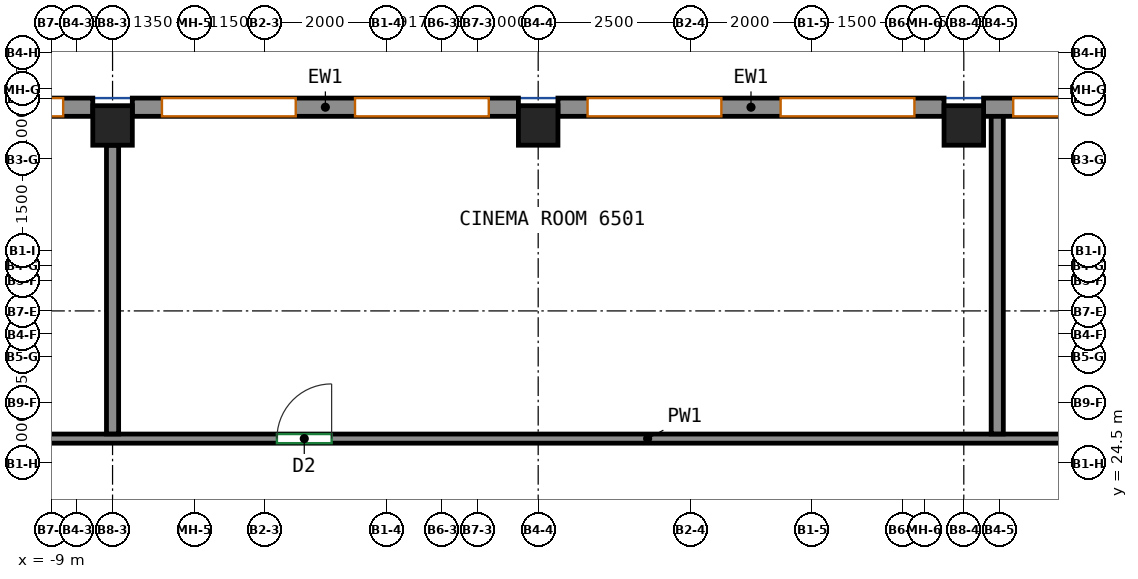
"""IFC4 building model, lengths in metres.
Left out: names, types, materials, properties, quantities, classifications, styles, units other than length and angle.
Written with IfcOpenShell. Run it as: python <this file> out.ifc"""

import sys

from ifc_helpers import new_model, si_unit, direction, frame, frame_2d, origin, origin_2d, place, context, subcontext, project, spatial, rectangle, extrude, source, transform, mapped, element, fill, save


model = new_model("IFC4")
c1 = context("Model", 3, precision=1e-05, world=origin(), true_north=direction((0.0, 1.0)))
c2 = subcontext(c1, "Body", "Model", "MODEL_VIEW")
j1 = project(units=[si_unit("LENGTHUNIT", "METRE"), si_unit("PLANEANGLEUNIT", "RADIAN")], contexts=[c1])
p1 = place(None, origin())
s1 = spatial("IfcSite", under=j1, at=p1, CompositionType="ELEMENT")
p2 = place(p1, origin())
s2 = spatial("IfcBuilding", under=s1, at=p2, CompositionType="ELEMENT")
p3 = place(p2, frame((0.0, 0.0, 267.0)))
s3 = spatial("IfcBuildingStorey", under=s2, at=p3, CompositionType="ELEMENT", Elevation=267.0)
m1 = source(origin(), c2, "Body", "SweptSolid", [
    extrude(rectangle(XDim=0.65, YDim=0.65, at=origin_2d()), origin(), (0.0, 0.0, 1.0), 3.12),
])
for number, where, z_axis, x_axis in (
    (1, (-8.0, 30.05, 0.0), (0.0, 0.0, 1.0), (1.0, 0.0, 0.0)),
    (2, (-1.0, 30.05, 0.0), (0.0, 0.0, 1.0), (1.0, 0.0, 0.0)),
    (3, (6.0, 30.05, 0.0), (0.0, 0.0, 1.0), (1.0, 0.0, 0.0)),
):
    element("IfcColumn", number, at=place(p3, frame(where, z_axis=z_axis, x_axis=x_axis)), inside=s3, PredefinedType="COLUMN", context=c2, shape_type="MappedRepresentation", body=[
        mapped(m1, transform((0.0, 0.0, 0.0))),
    ])
m2 = source(origin(), c2, "Body", "SweptSolid", [
    extrude(rectangle(XDim=6.35, YDim=0.3, at=frame_2d((3.175, 0.0))), origin(), (0.0, 0.0, 1.0), 3.12),
])
p4 = place(p3, frame((12.675, 30.35, 0.0), z_axis=(0.0, 0.0, 1.0), x_axis=(-1.0, 0.0, 0.0)))
e4 = element("IfcWall", 4, at=p4, inside=s3, PredefinedType="SOLIDWALL", context=c2, shape_type="MappedRepresentation", body=[
    mapped(m2, transform((0.0, 0.0, 0.0))),
])
p5 = place(p4, frame((0.488, 0.0, 0.8)))
e5 = element("IfcOpeningElement", 5, at=p5, cuts=e4, PredefinedType="OPENING", context=c2, shape_type="SweptSolid", body=[
    extrude(rectangle(XDim=2.2, YDim=2.05, at=frame_2d((1.1, 1.025))), frame((0.0, 0.16, 0.0), z_axis=(0.0, -1.0, 0.0), x_axis=(1.0, 0.0, 0.0)), (0.0, 0.0, 1.0), 0.32),
])
p6 = place(p4, frame((3.663, 0.0, 0.8)))
e6 = element("IfcOpeningElement", 6, at=p6, cuts=e4, PredefinedType="OPENING", context=c2, shape_type="SweptSolid", body=[
    extrude(rectangle(XDim=2.2, YDim=2.05, at=frame_2d((1.1, 1.025))), frame((0.0, 0.16, 0.0), z_axis=(0.0, -1.0, 0.0), x_axis=(1.0, 0.0, 0.0)), (0.0, 0.0, 1.0), 0.32),
])
p7 = place(p3, frame((5.675, 30.35, 0.0), z_axis=(0.0, 0.0, 1.0), x_axis=(-1.0, 0.0, 0.0)))
e7 = element("IfcWall", 7, at=p7, inside=s3, PredefinedType="SOLIDWALL", context=c2, shape_type="MappedRepresentation", body=[
    mapped(m2, transform((0.0, 0.0, 0.0))),
])
p8 = place(p7, frame((0.488, 0.0, 0.8)))
e8 = element("IfcOpeningElement", 8, at=p8, cuts=e7, PredefinedType="OPENING", context=c2, shape_type="SweptSolid", body=[
    extrude(rectangle(XDim=2.2, YDim=2.05, at=frame_2d((1.1, 1.025))), frame((0.0, 0.16, 0.0), z_axis=(0.0, -1.0, 0.0), x_axis=(1.0, 0.0, 0.0)), (0.0, 0.0, 1.0), 0.32),
])
p9 = place(p7, frame((3.663, 0.0, 0.8)))
e9 = element("IfcOpeningElement", 9, at=p9, cuts=e7, PredefinedType="OPENING", context=c2, shape_type="SweptSolid", body=[
    extrude(rectangle(XDim=2.2, YDim=2.05, at=frame_2d((1.1, 1.025))), frame((0.0, 0.16, 0.0), z_axis=(0.0, -1.0, 0.0), x_axis=(1.0, 0.0, 0.0)), (0.0, 0.0, 1.0), 0.32),
])
p10 = place(p3, frame((-1.325, 30.35, 0.0), z_axis=(0.0, 0.0, 1.0), x_axis=(-1.0, 0.0, 0.0)))
e10 = element("IfcWall", 10, at=p10, inside=s3, PredefinedType="SOLIDWALL", context=c2, shape_type="MappedRepresentation", body=[
    mapped(m2, transform((0.0, 0.0, 0.0))),
])
p11 = place(p10, frame((0.488, 0.0, 0.8)))
e11 = element("IfcOpeningElement", 11, at=p11, cuts=e10, PredefinedType="OPENING", context=c2, shape_type="SweptSolid", body=[
    extrude(rectangle(XDim=2.2, YDim=2.05, at=frame_2d((1.1, 1.025))), frame((0.0, 0.16, 0.0), z_axis=(0.0, -1.0, 0.0), x_axis=(1.0, 0.0, 0.0)), (0.0, 0.0, 1.0), 0.32),
])
p12 = place(p10, frame((3.663, 0.0, 0.8)))
e12 = element("IfcOpeningElement", 12, at=p12, cuts=e10, PredefinedType="OPENING", context=c2, shape_type="SweptSolid", body=[
    extrude(rectangle(XDim=2.2, YDim=2.05, at=frame_2d((1.1, 1.025))), frame((0.0, 0.16, 0.0), z_axis=(0.0, -1.0, 0.0), x_axis=(1.0, 0.0, 0.0)), (0.0, 0.0, 1.0), 0.32),
])
p13 = place(p3, frame((-8.325, 30.35, 0.0), z_axis=(0.0, 0.0, 1.0), x_axis=(-1.0, 0.0, 0.0)))
e13 = element("IfcWall", 13, at=p13, inside=s3, PredefinedType="SOLIDWALL", context=c2, shape_type="MappedRepresentation", body=[
    mapped(m2, transform((0.0, 0.0, 0.0))),
])
p14 = place(p13, frame((0.488, 0.0, 0.8)))
e14 = element("IfcOpeningElement", 14, at=p14, cuts=e13, PredefinedType="OPENING", context=c2, shape_type="SweptSolid", body=[
    extrude(rectangle(XDim=2.2, YDim=2.05, at=frame_2d((1.1, 1.025))), frame((0.0, 0.16, 0.0), z_axis=(0.0, -1.0, 0.0), x_axis=(1.0, 0.0, 0.0)), (0.0, 0.0, 1.0), 0.32),
])
p15 = place(p13, frame((3.663, 0.0, 0.8)))
e15 = element("IfcOpeningElement", 15, at=p15, cuts=e13, PredefinedType="OPENING", context=c2, shape_type="SweptSolid", body=[
    extrude(rectangle(XDim=2.2, YDim=2.05, at=frame_2d((1.1, 1.025))), frame((0.0, 0.16, 0.0), z_axis=(0.0, -1.0, 0.0), x_axis=(1.0, 0.0, 0.0)), (0.0, 0.0, 1.0), 0.32),
])
p16 = place(p3, frame((-19.075, 24.9, 0.0), z_axis=(0.0, 0.0, 1.0), x_axis=(1.0, 0.0, 0.0)))
e16 = element("IfcWall", 16, at=p16, inside=s3, PredefinedType="PARTITIONING", context=c2, shape_type="SweptSolid", body=[
    extrude(rectangle(XDim=39.75, YDim=0.15, at=frame_2d((19.875, 0.0))), origin(), (0.0, 0.0, 1.0), 3.12),
])
p17 = place(p16, frame((8.674, 0.0, 0.0)))
e17 = element("IfcOpeningElement", 17, at=p17, cuts=e16, PredefinedType="OPENING", context=c2, shape_type="SweptSolid", body=[
    extrude(rectangle(XDim=0.9, YDim=2.1, at=frame_2d((0.45, 1.05))), frame((0.0, 0.085, 0.0), z_axis=(0.0, -1.0, 0.0), x_axis=(1.0, 0.0, 0.0)), (0.0, 0.0, 1.0), 0.17),
])
p18 = place(p16, frame((13.778, 0.0, 0.0)))
e18 = element("IfcOpeningElement", 18, at=p18, cuts=e16, PredefinedType="OPENING", context=c2, shape_type="SweptSolid", body=[
    extrude(rectangle(XDim=0.9, YDim=2.1, at=frame_2d((0.45, 1.05))), frame((0.0, 0.085, 0.0), z_axis=(0.0, -1.0, 0.0), x_axis=(1.0, 0.0, 0.0)), (0.0, 0.0, 1.0), 0.17),
])
p19 = place(p3, frame((6.55, 24.977, 0.0), z_axis=(0.0, 0.0, 1.0), x_axis=(0.0, 1.0, 0.0)))
e19 = element("IfcWall", 19, at=p19, inside=s3, PredefinedType="PARTITIONING", context=c2, shape_type="SweptSolid", body=[
    extrude(rectangle(XDim=5.273, YDim=0.2, at=frame_2d((2.636, 0.0))), origin(), (0.0, 0.0, 1.0), 3.12),
])
p20 = place(p3, frame((-8.0, 29.725, 0.0), z_axis=(0.0, 0.0, 1.0), x_axis=(0.0, -1.0, 0.0)))
e20 = element("IfcWall", 20, at=p20, inside=s3, PredefinedType="PARTITIONING", context=c2, shape_type="SweptSolid", body=[
    extrude(rectangle(XDim=4.748, YDim=0.2, at=frame_2d((2.374, 0.0))), origin(), (0.0, 0.0, 1.0), 3.12),
])
p21 = place(p6, origin())
e21 = element("IfcWindow", 21, at=p21, inside=s3, PartitioningType="SINGLE_PANEL", PredefinedType="WINDOW", context=c2, shape_type="SweptSolid", body=[
    extrude(rectangle(XDim=2.2, YDim=2.05, at=frame_2d((1.1, 1.025))), frame((0.0, 0.03, 0.0), z_axis=(0.0, -1.0, 0.0), x_axis=(1.0, 0.0, 0.0)), (0.0, 0.0, 1.0), 0.06),
])
fill(e6, e21)
p22 = place(p8, origin())
e22 = element("IfcWindow", 22, at=p22, inside=s3, PartitioningType="SINGLE_PANEL", PredefinedType="WINDOW", context=c2, shape_type="SweptSolid", body=[
    extrude(rectangle(XDim=2.2, YDim=2.05, at=frame_2d((1.1, 1.025))), frame((0.0, 0.03, 0.0), z_axis=(0.0, -1.0, 0.0), x_axis=(1.0, 0.0, 0.0)), (0.0, 0.0, 1.0), 0.06),
])
fill(e8, e22)
p23 = place(p9, origin())
e23 = element("IfcWindow", 23, at=p23, inside=s3, PartitioningType="SINGLE_PANEL", PredefinedType="WINDOW", context=c2, shape_type="SweptSolid", body=[
    extrude(rectangle(XDim=2.2, YDim=2.05, at=frame_2d((1.1, 1.025))), frame((0.0, 0.03, 0.0), z_axis=(0.0, -1.0, 0.0), x_axis=(1.0, 0.0, 0.0)), (0.0, 0.0, 1.0), 0.06),
])
fill(e9, e23)
p24 = place(p11, origin())
e24 = element("IfcWindow", 24, at=p24, inside=s3, PartitioningType="SINGLE_PANEL", PredefinedType="WINDOW", context=c2, shape_type="SweptSolid", body=[
    extrude(rectangle(XDim=2.2, YDim=2.05, at=frame_2d((1.1, 1.025))), frame((0.0, 0.03, 0.0), z_axis=(0.0, -1.0, 0.0), x_axis=(1.0, 0.0, 0.0)), (0.0, 0.0, 1.0), 0.06),
])
fill(e11, e24)
p25 = place(p12, origin())
e25 = element("IfcWindow", 25, at=p25, inside=s3, PartitioningType="SINGLE_PANEL", PredefinedType="WINDOW", context=c2, shape_type="SweptSolid", body=[
    extrude(rectangle(XDim=2.2, YDim=2.05, at=frame_2d((1.1, 1.025))), frame((0.0, 0.03, 0.0), z_axis=(0.0, -1.0, 0.0), x_axis=(1.0, 0.0, 0.0)), (0.0, 0.0, 1.0), 0.06),
])
fill(e12, e25)
p26 = place(p14, origin())
e26 = element("IfcWindow", 26, at=p26, inside=s3, PartitioningType="SINGLE_PANEL", PredefinedType="WINDOW", context=c2, shape_type="SweptSolid", body=[
    extrude(rectangle(XDim=2.2, YDim=2.05, at=frame_2d((1.1, 1.025))), frame((0.0, 0.03, 0.0), z_axis=(0.0, -1.0, 0.0), x_axis=(1.0, 0.0, 0.0)), (0.0, 0.0, 1.0), 0.06),
])
fill(e14, e26)
p27 = place(p18, origin())
e27 = element("IfcDoor", 27, at=p27, inside=s3, OperationType="SINGLE_SWING_RIGHT", PredefinedType="DOOR", context=c2, shape_type="SweptSolid", body=[
    extrude(rectangle(XDim=0.9, YDim=2.1, at=frame_2d((0.45, 1.05))), frame((0.0, 0.025, 0.0), z_axis=(0.0, -1.0, 0.0), x_axis=(1.0, 0.0, 0.0)), (0.0, 0.0, 1.0), 0.05),
])
fill(e18, e27)
save(model, sys.argv[1])
